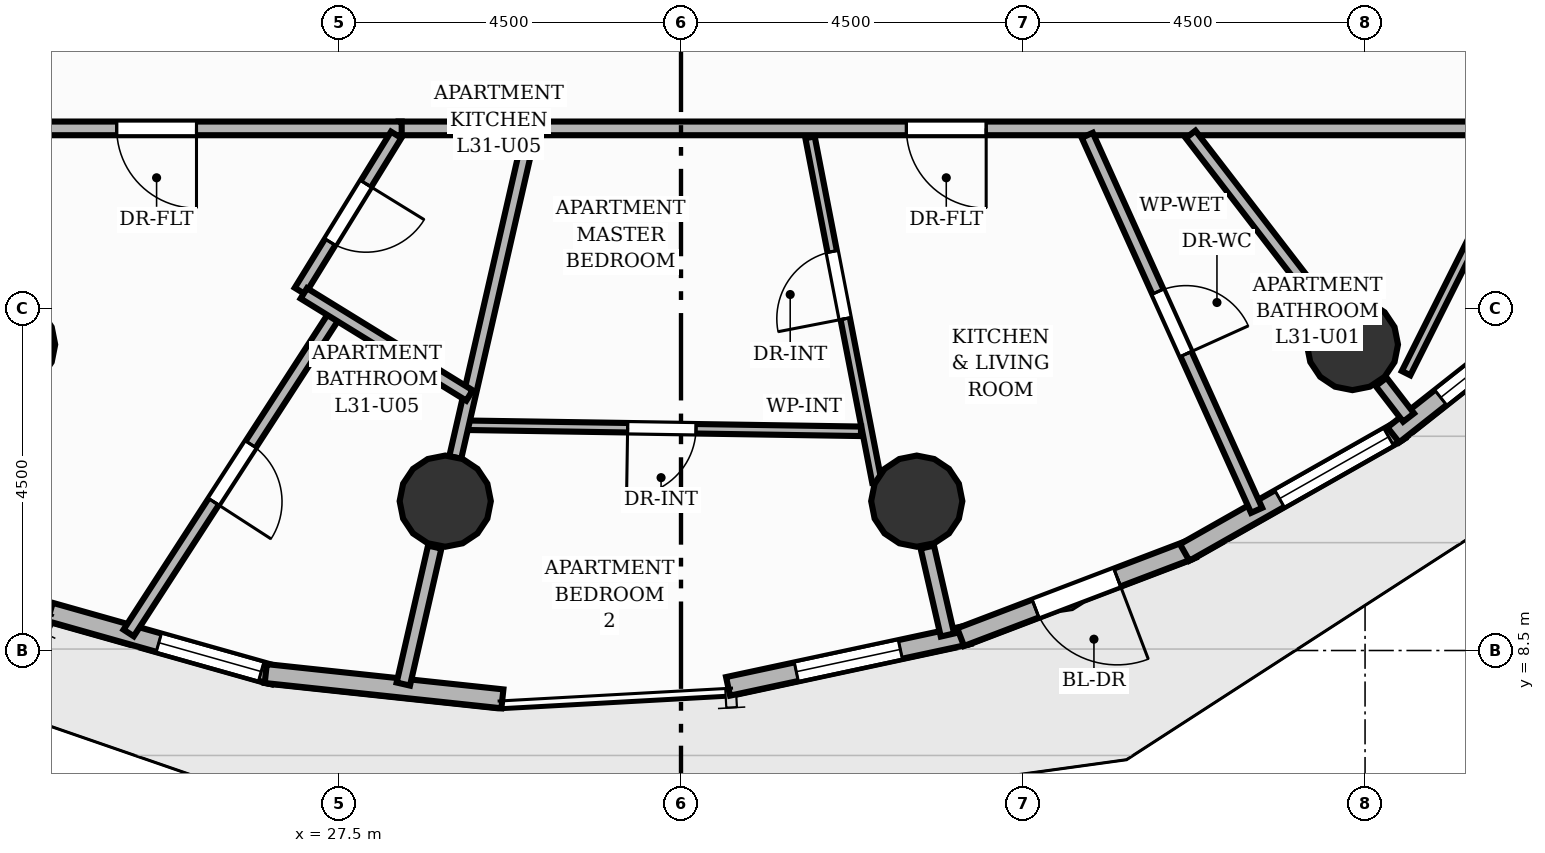
"""IFC4 building model, lengths in metres.
Left out: names, types, materials, properties, quantities, classifications, styles, units other than length and angle.
Written with IfcOpenShell. Run it as: python <this file> out.ifc"""

import sys

from ifc_helpers import new_model, si_unit, direction, frame, frame_2d, origin, origin_2d, place, context, subcontext, project, spatial, rectangle, circle, extrude, element, fill, save


model = new_model("IFC4")
c1 = context("Model", 3, precision=1e-05, world=origin(), true_north=direction((0.0, 1.0)))
c2 = subcontext(c1, "Body", "Model", "MODEL_VIEW")
j1 = project(units=[si_unit("LENGTHUNIT", "METRE"), si_unit("PLANEANGLEUNIT", "RADIAN")], contexts=[c1])
p1 = place(None, origin())
s1 = spatial("IfcSite", under=j1, at=p1, CompositionType="ELEMENT")
p2 = place(p1, origin())
s2 = spatial("IfcBuilding", under=s1, at=p2, CompositionType="ELEMENT")
p3 = place(p2, frame((0.0, 0.0, 106.08)))
s3 = spatial("IfcBuildingStorey", under=s2, at=p3, CompositionType="ELEMENT", Elevation=106.08)
for number, where, z_axis, x_axis in (
    (1, (23.167, 12.526, 0.0), (0.0, 0.0, 1.0), (1.0, 0.0, 0.0)),
    (2, (28.898, 10.465, 0.0), (0.0, 0.0, 1.0), (1.0, 0.0, 0.0)),
    (3, (35.102, 10.465, 0.0), (0.0, 0.0, 1.0), (1.0, 0.0, 0.0)),
    (4, (40.833, 12.526, 0.0), (0.0, 0.0, 1.0), (1.0, 0.0, 0.0)),
):
    element("IfcColumn", number, at=place(p3, frame(where, z_axis=z_axis, x_axis=x_axis)), inside=s3, PredefinedType="COLUMN", context=c2, shape_type="SweptSolid", body=[
        extrude(circle(Radius=0.6, at=origin_2d()), origin(), (0.0, 0.0, 1.0), 3.2),
    ])
p4 = place(p3, frame((26.646, 8.175, 0.0), z_axis=(0.0, 0.0, 1.0), x_axis=(-0.962391946781, 0.271664758059, 0.0)))
e5 = element("IfcWall", 5, at=p4, inside=s3, PredefinedType="SOLIDWALL", context=c2, shape_type="SweptSolid", body=[
    extrude(rectangle(XDim=3.061, YDim=0.25, at=frame_2d((1.531, 0.0))), origin(), (0.0, 0.0, 1.0), 2.96),
])
p5 = place(p4, frame((0.175, 0.0, 0.85)))
e6 = element("IfcOpeningElement", 6, at=p5, cuts=e5, PredefinedType="OPENING", context=c2, shape_type="SweptSolid", body=[
    extrude(rectangle(XDim=1.4, YDim=1.55, at=frame_2d((0.7, 0.775))), frame((0.0, 0.135, 0.0), z_axis=(0.0, -1.0, 0.0), x_axis=(1.0, 0.0, 0.0)), (0.0, 0.0, 1.0), 0.27),
])
p6 = place(p3, frame((29.65, 7.864, 0.0), z_axis=(0.0, 0.0, 1.0), x_axis=(-0.994353607356, 0.106117404502, 0.0)))
e7 = element("IfcWall", 7, at=p6, inside=s3, PredefinedType="SOLIDWALL", context=c2, shape_type="SweptSolid", body=[
    extrude(rectangle(XDim=3.131, YDim=0.25, at=frame_2d((1.565, 0.0))), origin(), (0.0, 0.0, 1.0), 2.96),
])
p7 = place(p3, frame((35.783, 8.707, 0.0), z_axis=(0.0, 0.0, 1.0), x_axis=(-0.977758229837, -0.209735175845, 0.0)))
e8 = element("IfcWall", 8, at=p7, inside=s3, PredefinedType="SOLIDWALL", context=c2, shape_type="SweptSolid", body=[
    extrude(rectangle(XDim=3.236, YDim=0.25, at=frame_2d((1.618, 0.0))), origin(), (0.0, 0.0, 1.0), 2.96),
])
p8 = place(p7, frame((0.918, 0.0, 0.85)))
e9 = element("IfcOpeningElement", 9, at=p8, cuts=e8, PredefinedType="OPENING", context=c2, shape_type="SweptSolid", body=[
    extrude(rectangle(XDim=1.4, YDim=1.55, at=frame_2d((0.7, 0.775))), frame((0.0, 0.135, 0.0), z_axis=(0.0, -1.0, 0.0), x_axis=(1.0, 0.0, 0.0)), (0.0, 0.0, 1.0), 0.27),
])
p9 = place(p3, frame((38.725, 9.836, 0.0), z_axis=(0.0, 0.0, 1.0), x_axis=(-0.934481801939, -0.3560109013, 0.0)))
e10 = element("IfcWall", 10, at=p9, inside=s3, PredefinedType="SOLIDWALL", context=c2, shape_type="SweptSolid", body=[
    extrude(rectangle(XDim=3.26, YDim=0.25, at=frame_2d((1.63, 0.0))), origin(), (0.0, 0.0, 1.0), 2.96),
])
p10 = place(p9, frame((1.055, 0.0, 0.0)))
e11 = element("IfcOpeningElement", 11, at=p10, cuts=e10, PredefinedType="OPENING", context=c2, shape_type="SweptSolid", body=[
    extrude(rectangle(XDim=1.15, YDim=2.2, at=frame_2d((0.575, 1.1))), frame((0.0, 0.135, 0.0), z_axis=(0.0, -1.0, 0.0), x_axis=(1.0, 0.0, 0.0)), (0.0, 0.0, 1.0), 0.27),
])
p11 = place(p3, frame((41.462, 11.397, 0.0), z_axis=(0.0, 0.0, 1.0), x_axis=(-0.869984700924, -0.493078715986, 0.0)))
e12 = element("IfcWall", 12, at=p11, inside=s3, PredefinedType="SOLIDWALL", context=c2, shape_type="SweptSolid", body=[
    extrude(rectangle(XDim=3.26, YDim=0.25, at=frame_2d((1.63, 0.0))), origin(), (0.0, 0.0, 1.0), 2.96),
])
p12 = place(p11, frame((0.175, 0.0, 0.85)))
e13 = element("IfcOpeningElement", 13, at=p12, cuts=e12, PredefinedType="OPENING", context=c2, shape_type="SweptSolid", body=[
    extrude(rectangle(XDim=1.65, YDim=1.55, at=frame_2d((0.825, 0.775))), frame((0.0, 0.135, 0.0), z_axis=(0.0, -1.0, 0.0), x_axis=(1.0, 0.0, 0.0)), (0.0, 0.0, 1.0), 0.27),
])
p13 = place(p3, frame((43.912, 13.342, 0.0), z_axis=(0.0, 0.0, 1.0), x_axis=(-0.784871179145, -0.619658964389, 0.0)))
e14 = element("IfcWall", 14, at=p13, inside=s3, PredefinedType="SOLIDWALL", context=c2, shape_type="SweptSolid", body=[
    extrude(rectangle(XDim=3.236, YDim=0.25, at=frame_2d((1.618, 0.0))), origin(), (0.0, 0.0, 1.0), 2.96),
])
p14 = place(p13, frame((0.793, 0.0, 0.85)))
e15 = element("IfcOpeningElement", 15, at=p14, cuts=e14, PredefinedType="OPENING", context=c2, shape_type="SweptSolid", body=[
    extrude(rectangle(XDim=1.65, YDim=1.55, at=frame_2d((0.825, 0.775))), frame((0.0, 0.135, 0.0), z_axis=(0.0, -1.0, 0.0), x_axis=(1.0, 0.0, 0.0)), (0.0, 0.0, 1.0), 0.27),
])
p15 = place(p3, frame((28.76, 9.861, 0.0), z_axis=(0.0, 0.0, 1.0), x_axis=(-0.2234127464, -0.974723932581, 0.0)))
e16 = element("IfcWall", 16, at=p15, inside=s3, PredefinedType="PARTITIONING", context=c2, shape_type="SweptSolid", body=[
    extrude(rectangle(XDim=1.849, YDim=0.18, at=frame_2d((0.924, 0.0))), origin(), (0.0, 0.0, 1.0), 2.26),
])
p16 = place(p3, frame((35.24, 9.861, 0.0), z_axis=(0.0, 0.0, 1.0), x_axis=(0.223327310752, -0.974743511018, 0.0)))
e17 = element("IfcWall", 17, at=p16, inside=s3, PredefinedType="PARTITIONING", context=c2, shape_type="SweptSolid", body=[
    extrude(rectangle(XDim=1.187, YDim=0.18, at=frame_2d((0.594, 0.0))), origin(), (0.0, 0.0, 1.0), 2.26),
])
p17 = place(p3, frame((41.212, 12.034, 0.0), z_axis=(0.0, 0.0, 1.0), x_axis=(0.609790512648, -0.792562635181, 0.0)))
e18 = element("IfcWall", 18, at=p17, inside=s3, PredefinedType="PARTITIONING", context=c2, shape_type="SweptSolid", body=[
    extrude(rectangle(XDim=0.592, YDim=0.18, at=frame_2d((0.296, 0.0))), origin(), (0.0, 0.0, 1.0), 2.26),
])
p18 = place(p3, frame((42.63, 15.37, 0.0), z_axis=(0.0, 0.0, 1.0), x_axis=(-1.0, 0.0, 0.0)))
e19 = element("IfcWall", 19, at=p18, inside=s3, PredefinedType="PARTITIONING", context=c2, shape_type="SweptSolid", body=[
    extrude(rectangle(XDim=14.346, YDim=0.18, at=frame_2d((7.173, 0.0))), origin(), (0.0, 0.0, 1.0), 2.955),
])
p19 = place(p18, frame((6.615, 0.0, 0.0)))
e20 = element("IfcOpeningElement", 20, at=p19, cuts=e19, PredefinedType="OPENING", context=c2, shape_type="SweptSolid", body=[
    extrude(rectangle(XDim=1.05, YDim=2.15, at=frame_2d((0.525, 1.075))), frame((0.0, 0.1, 0.0), z_axis=(0.0, -1.0, 0.0), x_axis=(1.0, 0.0, 0.0)), (0.0, 0.0, 1.0), 0.2),
])
p20 = place(p3, frame((28.325, 15.37, 0.0), z_axis=(0.0, 0.0, 1.0), x_axis=(-1.0, 0.0, 0.0)))
e21 = element("IfcWall", 21, at=p20, inside=s3, PredefinedType="PARTITIONING", context=c2, shape_type="SweptSolid", body=[
    extrude(rectangle(XDim=6.955, YDim=0.18, at=frame_2d((3.478, 0.0))), origin(), (0.0, 0.0, 1.0), 2.955),
])
p21 = place(p20, frame((2.7, 0.0, 0.0)))
e22 = element("IfcOpeningElement", 22, at=p21, cuts=e21, PredefinedType="OPENING", context=c2, shape_type="SweptSolid", body=[
    extrude(rectangle(XDim=1.05, YDim=2.15, at=frame_2d((0.525, 1.075))), frame((0.0, 0.1, 0.0), z_axis=(0.0, -1.0, 0.0), x_axis=(1.0, 0.0, 0.0)), (0.0, 0.0, 1.0), 0.2),
])
p22 = place(p3, frame((37.345, 15.279, 0.0), z_axis=(0.0, 0.0, 1.0), x_axis=(0.411532357021, -0.911395149825, 0.0)))
e23 = element("IfcWall", 23, at=p22, inside=s3, PredefinedType="PLUMBINGWALL", context=c2, shape_type="SweptSolid", body=[
    extrude(rectangle(XDim=5.415, YDim=0.16, at=frame_2d((2.707, 0.0))), origin(), (0.0, 0.0, 1.0), 2.641),
])
p23 = place(p22, frame((2.257, 0.0, 0.0)))
e24 = element("IfcOpeningElement", 24, at=p23, cuts=e23, PredefinedType="OPENING", context=c2, shape_type="SweptSolid", body=[
    extrude(rectangle(XDim=0.9, YDim=2.1, at=frame_2d((0.45, 1.05))), frame((0.0, 0.09, 0.0), z_axis=(0.0, -1.0, 0.0), x_axis=(1.0, 0.0, 0.0)), (0.0, 0.0, 1.0), 0.18),
])
p24 = place(p3, frame((34.577, 10.719, 0.0), z_axis=(0.0, 0.0, 1.0), x_axis=(-0.19043944415, 0.981698944744, 0.0)))
e25 = element("IfcWall", 25, at=p24, inside=s3, PredefinedType="PARTITIONING", context=c2, shape_type="SweptSolid", body=[
    extrude(rectangle(XDim=4.618, YDim=0.125, at=frame_2d((2.309, 0.0))), origin(), (0.0, 0.0, 1.0), 2.955),
])
p25 = place(p24, frame((2.187, 0.0, 0.0)))
e26 = element("IfcOpeningElement", 26, at=p25, cuts=e25, PredefinedType="OPENING", context=c2, shape_type="SweptSolid", body=[
    extrude(rectangle(XDim=0.9, YDim=2.1, at=frame_2d((0.45, 1.05))), frame((0.0, 0.073, 0.0), z_axis=(0.0, -1.0, 0.0), x_axis=(1.0, 0.0, 0.0)), (0.0, 0.0, 1.0), 0.145),
])
p26 = place(p3, frame((38.705, 15.291, 0.0), z_axis=(0.0, 0.0, 1.0), x_axis=(0.610033601295, -0.792375545617, 0.0)))
e27 = element("IfcWall", 27, at=p26, inside=s3, PredefinedType="PLUMBINGWALL", context=c2, shape_type="SweptSolid", body=[
    extrude(rectangle(XDim=2.887, YDim=0.16, at=frame_2d((1.443, 0.0))), origin(), (0.0, 0.0, 1.0), 2.26),
])
p27 = place(p3, frame((34.368, 11.384, 0.0), z_axis=(0.0, 0.0, 1.0), x_axis=(-0.999882579861, 0.015324049414, 0.0)))
e28 = element("IfcWall", 28, at=p27, inside=s3, PredefinedType="PARTITIONING", context=c2, shape_type="SweptSolid", body=[
    extrude(rectangle(XDim=5.242, YDim=0.125, at=frame_2d((2.621, 0.0))), origin(), (0.0, 0.0, 1.0), 2.955),
])
p28 = place(p27, frame((2.171, 0.0, 0.0)))
e29 = element("IfcOpeningElement", 29, at=p28, cuts=e28, PredefinedType="OPENING", context=c2, shape_type="SweptSolid", body=[
    extrude(rectangle(XDim=0.9, YDim=2.1, at=frame_2d((0.45, 1.05))), frame((0.0, 0.073, 0.0), z_axis=(0.0, -1.0, 0.0), x_axis=(1.0, 0.0, 0.0)), (0.0, 0.0, 1.0), 0.145),
])
p29 = place(p3, frame((29.03, 11.041, 0.0), z_axis=(0.0, 0.0, 1.0), x_axis=(0.223478419757, 0.974708877513, 0.0)))
e30 = element("IfcWall", 30, at=p29, inside=s3, PredefinedType="PLUMBINGWALL", context=c2, shape_type="SweptSolid", body=[
    extrude(rectangle(XDim=4.442, YDim=0.16, at=frame_2d((2.221, 0.0))), origin(), (0.0, 0.0, 1.0), 2.26),
])
p30 = place(p3, frame((46.746, 22.528, 0.0), z_axis=(0.0, 0.0, 1.0), x_axis=(-0.448357094434, -0.893854527242, 0.0)))
e31 = element("IfcWall", 31, at=p30, inside=s3, PredefinedType="PARTITIONING", context=c2, shape_type="SweptSolid", body=[
    extrude(rectangle(XDim=11.611, YDim=0.125, at=frame_2d((5.805, 0.0))), origin(), (0.0, 0.0, 1.0), 2.403),
])
p31 = place(p30, frame((4.375, 0.0, 0.0)))
e32 = element("IfcOpeningElement", 32, at=p31, cuts=e31, PredefinedType="OPENING", context=c2, shape_type="SweptSolid", body=[
    extrude(rectangle(XDim=0.9, YDim=2.1, at=frame_2d((0.45, 1.05))), frame((0.0, 0.073, 0.0), z_axis=(0.0, -1.0, 0.0), x_axis=(1.0, 0.0, 0.0)), (0.0, 0.0, 1.0), 0.145),
])
p32 = place(p3, frame((27.458, 12.94, 0.0), z_axis=(0.0, 0.0, 1.0), x_axis=(-0.543424886613, -0.839457796801, 0.0)))
e33 = element("IfcWall", 33, at=p32, inside=s3, PredefinedType="PLUMBINGWALL", context=c2, shape_type="SweptSolid", body=[
    extrude(rectangle(XDim=5.014, YDim=0.16, at=frame_2d((2.507, 0.0))), origin(), (0.0, 0.0, 1.0), 2.641),
])
p33 = place(p32, frame((2.057, 0.0, 0.0)))
e34 = element("IfcOpeningElement", 34, at=p33, cuts=e33, PredefinedType="OPENING", context=c2, shape_type="SweptSolid", body=[
    extrude(rectangle(XDim=0.9, YDim=2.1, at=frame_2d((0.45, 1.05))), frame((0.0, 0.09, 0.0), z_axis=(0.0, -1.0, 0.0), x_axis=(1.0, 0.0, 0.0)), (0.0, 0.0, 1.0), 0.18),
])
p34 = place(p3, frame((28.253, 15.285, 0.0), z_axis=(0.0, 0.0, 1.0), x_axis=(-0.524605293124, -0.851345574033, 0.0)))
e35 = element("IfcWall", 35, at=p34, inside=s3, PredefinedType="PLUMBINGWALL", context=c2, shape_type="SweptSolid", body=[
    extrude(rectangle(XDim=2.414, YDim=0.16, at=frame_2d((1.207, 0.0))), origin(), (0.0, 0.0, 1.0), 2.955),
])
p35 = place(p34, frame((0.757, 0.0, 0.0)))
e36 = element("IfcOpeningElement", 36, at=p35, cuts=e35, PredefinedType="OPENING", context=c2, shape_type="SweptSolid", body=[
    extrude(rectangle(XDim=0.9, YDim=2.1, at=frame_2d((0.45, 1.05))), frame((0.0, 0.09, 0.0), z_axis=(0.0, -1.0, 0.0), x_axis=(1.0, 0.0, 0.0)), (0.0, 0.0, 1.0), 0.18),
])
p36 = place(p3, frame((27.038, 13.199, 0.0), z_axis=(0.0, 0.0, 1.0), x_axis=(0.851314293413, -0.524656052887, 0.0)))
e37 = element("IfcWall", 37, at=p36, inside=s3, PredefinedType="PLUMBINGWALL", context=c2, shape_type="SweptSolid", body=[
    extrude(rectangle(XDim=2.56, YDim=0.16, at=frame_2d((1.28, 0.0))), origin(), (0.0, 0.0, 1.0), 2.955),
])
p37 = place(p10, origin())
e38 = element("IfcDoor", 38, at=p37, inside=s3, OperationType="SINGLE_SWING_LEFT", PredefinedType="DOOR", context=c2, shape_type="SweptSolid", body=[
    extrude(rectangle(XDim=1.15, YDim=2.2, at=frame_2d((0.575, 1.1))), frame((0.0, 0.025, 0.0), z_axis=(0.0, -1.0, 0.0), x_axis=(1.0, 0.0, 0.0)), (0.0, 0.0, 1.0), 0.05),
])
fill(e11, e38)
p38 = place(p5, origin())
e39 = element("IfcWindow", 39, at=p38, inside=s3, PartitioningType="SINGLE_PANEL", PredefinedType="WINDOW", context=c2, shape_type="SweptSolid", body=[
    extrude(rectangle(XDim=1.4, YDim=1.55, at=frame_2d((0.7, 0.775))), frame((0.0, 0.03, 0.0), z_axis=(0.0, -1.0, 0.0), x_axis=(1.0, 0.0, 0.0)), (0.0, 0.0, 1.0), 0.06),
])
fill(e6, e39)
p39 = place(p8, origin())
e40 = element("IfcWindow", 40, at=p39, inside=s3, PartitioningType="SINGLE_PANEL", PredefinedType="WINDOW", context=c2, shape_type="SweptSolid", body=[
    extrude(rectangle(XDim=1.4, YDim=1.55, at=frame_2d((0.7, 0.775))), frame((0.0, 0.03, 0.0), z_axis=(0.0, -1.0, 0.0), x_axis=(1.0, 0.0, 0.0)), (0.0, 0.0, 1.0), 0.06),
])
fill(e9, e40)
p40 = place(p12, origin())
e41 = element("IfcWindow", 41, at=p40, inside=s3, PartitioningType="SINGLE_PANEL", PredefinedType="WINDOW", context=c2, shape_type="SweptSolid", body=[
    extrude(rectangle(XDim=1.65, YDim=1.55, at=frame_2d((0.825, 0.775))), frame((0.0, 0.03, 0.0), z_axis=(0.0, -1.0, 0.0), x_axis=(1.0, 0.0, 0.0)), (0.0, 0.0, 1.0), 0.06),
])
fill(e13, e41)
p41 = place(p14, origin())
e42 = element("IfcWindow", 42, at=p41, inside=s3, PartitioningType="SINGLE_PANEL", PredefinedType="WINDOW", context=c2, shape_type="SweptSolid", body=[
    extrude(rectangle(XDim=1.65, YDim=1.55, at=frame_2d((0.825, 0.775))), frame((0.0, 0.03, 0.0), z_axis=(0.0, -1.0, 0.0), x_axis=(1.0, 0.0, 0.0)), (0.0, 0.0, 1.0), 0.06),
])
fill(e15, e42)
p42 = place(p19, origin())
e43 = element("IfcDoor", 43, at=p42, inside=s3, OperationType="SINGLE_SWING_LEFT", PredefinedType="DOOR", context=c2, shape_type="SweptSolid", body=[
    extrude(rectangle(XDim=1.05, YDim=2.15, at=frame_2d((0.525, 1.075))), frame((0.0, 0.025, 0.0), z_axis=(0.0, -1.0, 0.0), x_axis=(1.0, 0.0, 0.0)), (0.0, 0.0, 1.0), 0.05),
])
fill(e20, e43)
p43 = place(p23, origin())
e44 = element("IfcDoor", 44, at=p43, inside=s3, OperationType="SINGLE_SWING_RIGHT", PredefinedType="DOOR", context=c2, shape_type="SweptSolid", body=[
    extrude(rectangle(XDim=0.9, YDim=2.1, at=frame_2d((0.45, 1.05))), frame((0.0, 0.025, 0.0), z_axis=(0.0, -1.0, 0.0), x_axis=(1.0, 0.0, 0.0)), (0.0, 0.0, 1.0), 0.05),
])
fill(e24, e44)
p44 = place(p25, origin())
e45 = element("IfcDoor", 45, at=p44, inside=s3, OperationType="SINGLE_SWING_LEFT", PredefinedType="DOOR", context=c2, shape_type="SweptSolid", body=[
    extrude(rectangle(XDim=0.9, YDim=2.1, at=frame_2d((0.45, 1.05))), frame((0.0, 0.025, 0.0), z_axis=(0.0, -1.0, 0.0), x_axis=(1.0, 0.0, 0.0)), (0.0, 0.0, 1.0), 0.05),
])
fill(e26, e45)
p45 = place(p28, origin())
e46 = element("IfcDoor", 46, at=p45, inside=s3, OperationType="SINGLE_SWING_RIGHT", PredefinedType="DOOR", context=c2, shape_type="SweptSolid", body=[
    extrude(rectangle(XDim=0.9, YDim=2.1, at=frame_2d((0.45, 1.05))), frame((0.0, 0.025, 0.0), z_axis=(0.0, -1.0, 0.0), x_axis=(1.0, 0.0, 0.0)), (0.0, 0.0, 1.0), 0.05),
])
fill(e29, e46)
p46 = place(p21, origin())
e47 = element("IfcDoor", 47, at=p46, inside=s3, OperationType="SINGLE_SWING_LEFT", PredefinedType="DOOR", context=c2, shape_type="SweptSolid", body=[
    extrude(rectangle(XDim=1.05, YDim=2.15, at=frame_2d((0.525, 1.075))), frame((0.0, 0.025, 0.0), z_axis=(0.0, -1.0, 0.0), x_axis=(1.0, 0.0, 0.0)), (0.0, 0.0, 1.0), 0.05),
])
fill(e22, e47)
p47 = place(p33, origin())
e48 = element("IfcDoor", 48, at=p47, inside=s3, OperationType="SINGLE_SWING_RIGHT", PredefinedType="DOOR", context=c2, shape_type="SweptSolid", body=[
    extrude(rectangle(XDim=0.9, YDim=2.1, at=frame_2d((0.45, 1.05))), frame((0.0, 0.025, 0.0), z_axis=(0.0, -1.0, 0.0), x_axis=(1.0, 0.0, 0.0)), (0.0, 0.0, 1.0), 0.05),
])
fill(e34, e48)
p48 = place(p35, origin())
e49 = element("IfcDoor", 49, at=p48, inside=s3, OperationType="SINGLE_SWING_LEFT", PredefinedType="DOOR", context=c2, shape_type="SweptSolid", body=[
    extrude(rectangle(XDim=0.9, YDim=2.1, at=frame_2d((0.45, 1.05))), frame((0.0, 0.025, 0.0), z_axis=(0.0, -1.0, 0.0), x_axis=(1.0, 0.0, 0.0)), (0.0, 0.0, 1.0), 0.05),
])
fill(e36, e49)
save(model, sys.argv[1])
